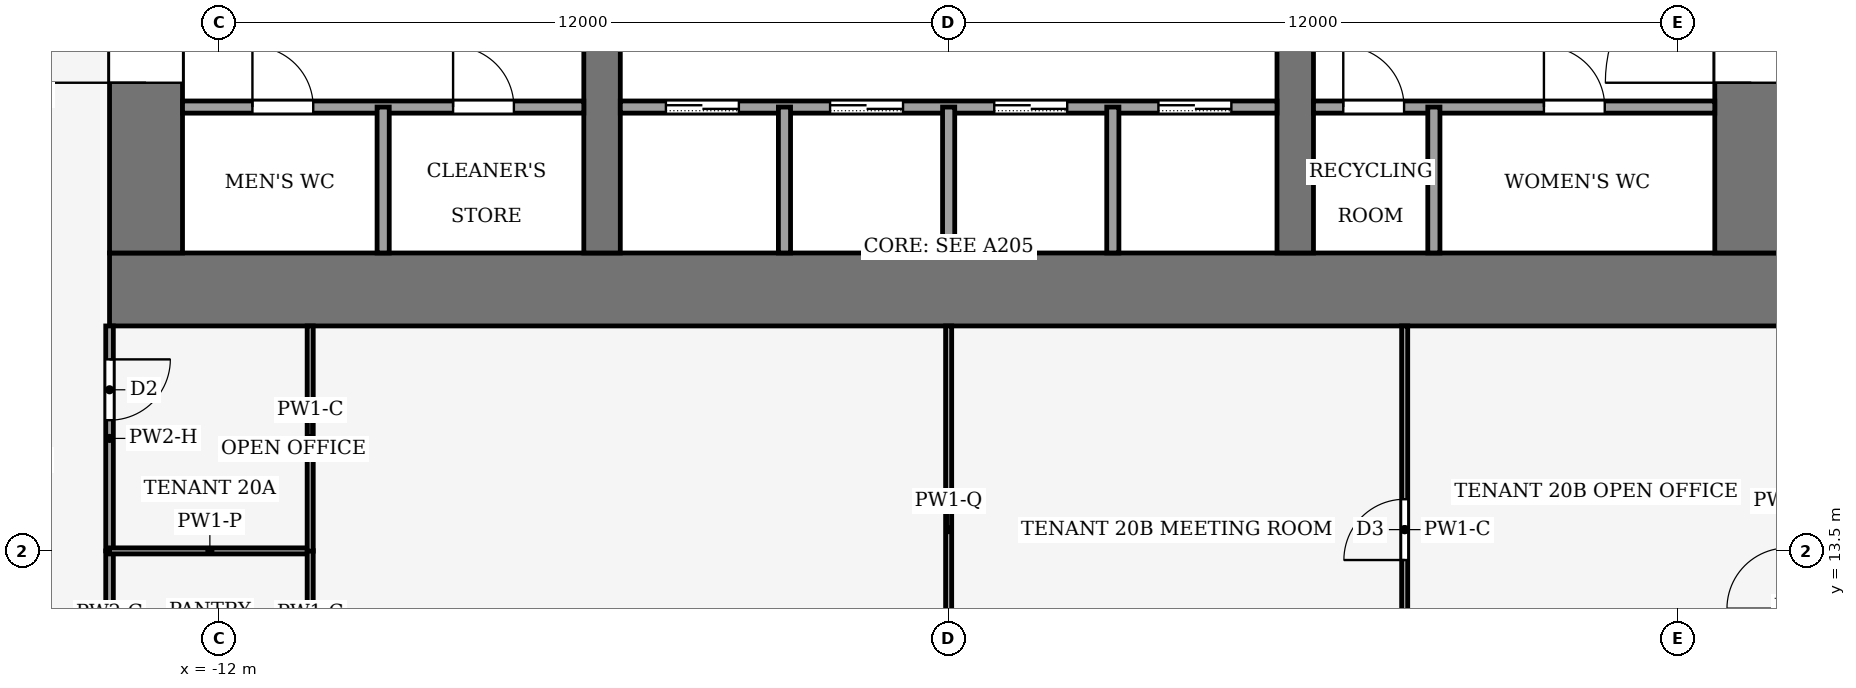
"""IFC4 building model, lengths in metres.
Left out: names, types, materials, properties, quantities, classifications, styles, units other than length and angle.
Written with IfcOpenShell. Run it as: python <this file> out.ifc"""

import sys

from ifc_helpers import new_model, si_unit, direction, frame, frame_2d, origin, place, context, subcontext, project, spatial, rectangle, extrude, element, fill, save


model = new_model("IFC4")
c1 = context("Model", 3, precision=1e-05, world=origin(), true_north=direction((0.0, 1.0)))
c2 = subcontext(c1, "Body", "Model", "MODEL_VIEW")
j1 = project(units=[si_unit("LENGTHUNIT", "METRE"), si_unit("PLANEANGLEUNIT", "RADIAN")], contexts=[c1])
p1 = place(None, origin())
s1 = spatial("IfcSite", under=j1, at=p1, CompositionType="ELEMENT")
p2 = place(p1, origin())
s2 = spatial("IfcBuilding", under=s1, at=p2, CompositionType="ELEMENT")
p3 = place(p2, frame((0.0, 0.0, 90.0)))
s3 = spatial("IfcBuildingStorey", under=s2, at=p3, CompositionType="ELEMENT", Elevation=90.0)
p4 = place(p3, frame((-13.8, 17.8, -0.13), z_axis=(0.0, 0.0, 1.0), x_axis=(1.0, 0.0, 0.0)))
e1 = element("IfcWall", 1, at=p4, inside=s3, PredefinedType="SHEAR", context=c2, shape_type="SweptSolid", body=[
    extrude(rectangle(XDim=27.6, YDim=1.2, at=frame_2d((13.8, 0.0))), origin(), (0.0, 0.0, 1.0), 4.0),
])
p5 = place(p3, frame((-13.2, 18.4, -0.13), z_axis=(0.0, 0.0, 1.0), x_axis=(0.0, 1.0, 0.0)))
e2 = element("IfcWall", 2, at=p5, inside=s3, PredefinedType="SHEAR", context=c2, shape_type="SweptSolid", body=[
    extrude(rectangle(XDim=19.2, YDim=1.2, at=frame_2d((9.6, 0.0))), origin(), (0.0, 0.0, 1.0), 4.0),
])
p6 = place(p5, frame((2.8, 0.0, 0.13)))
e3 = element("IfcOpeningElement", 3, at=p6, cuts=e2, PredefinedType="OPENING", context=c2, shape_type="SweptSolid", body=[
    extrude(rectangle(XDim=2.4, YDim=2.4, at=frame_2d((1.2, 1.2))), frame((0.0, 0.61, 0.0), z_axis=(0.0, -1.0, 0.0), x_axis=(1.0, 0.0, 0.0)), (0.0, 0.0, 1.0), 1.22),
])
p7 = place(p5, frame((13.4, 0.0, 0.13)))
e4 = element("IfcOpeningElement", 4, at=p7, cuts=e2, PredefinedType="OPENING", context=c2, shape_type="SweptSolid", body=[
    extrude(rectangle(XDim=1.4, YDim=2.2, at=frame_2d((0.7, 1.1))), frame((0.0, 0.61, 0.0), z_axis=(0.0, -1.0, 0.0), x_axis=(1.0, 0.0, 0.0)), (0.0, 0.0, 1.0), 1.22),
])
p8 = place(p3, frame((13.2, 18.4, -0.13), z_axis=(0.0, 0.0, 1.0), x_axis=(0.0, 1.0, 0.0)))
e5 = element("IfcWall", 5, at=p8, inside=s3, PredefinedType="SHEAR", context=c2, shape_type="SweptSolid", body=[
    extrude(rectangle(XDim=19.2, YDim=1.2, at=frame_2d((9.6, 0.0))), origin(), (0.0, 0.0, 1.0), 4.0),
])
p9 = place(p8, frame((2.8, 0.0, 0.13)))
e6 = element("IfcOpeningElement", 6, at=p9, cuts=e5, PredefinedType="OPENING", context=c2, shape_type="SweptSolid", body=[
    extrude(rectangle(XDim=2.4, YDim=2.4, at=frame_2d((1.2, 1.2))), frame((0.0, 0.61, 0.0), z_axis=(0.0, -1.0, 0.0), x_axis=(1.0, 0.0, 0.0)), (0.0, 0.0, 1.0), 1.22),
])
p10 = place(p8, frame((13.3, 0.0, 0.13)))
e7 = element("IfcOpeningElement", 7, at=p10, cuts=e5, PredefinedType="OPENING", context=c2, shape_type="SweptSolid", body=[
    extrude(rectangle(XDim=2.4, YDim=2.4, at=frame_2d((1.2, 1.2))), frame((0.0, 0.61, 0.0), z_axis=(0.0, -1.0, 0.0), x_axis=(1.0, 0.0, 0.0)), (0.0, 0.0, 1.0), 1.22),
])
p11 = place(p3, frame((-5.7, 18.4, -0.13), z_axis=(0.0, 0.0, 1.0), x_axis=(0.0, 1.0, 0.0)))
e8 = element("IfcWall", 8, at=p11, inside=s3, PredefinedType="SHEAR", context=c2, shape_type="SweptSolid", body=[
    extrude(rectangle(XDim=19.2, YDim=0.6, at=frame_2d((9.6, 0.0))), origin(), (0.0, 0.0, 1.0), 4.0),
])
p12 = place(p11, frame((8.35, 0.0, 0.13)))
e9 = element("IfcOpeningElement", 9, at=p12, cuts=e8, PredefinedType="OPENING", context=c2, shape_type="SweptSolid", body=[
    extrude(rectangle(XDim=0.9, YDim=2.1, at=frame_2d((0.45, 1.05))), frame((0.0, 0.31, 0.0), z_axis=(0.0, -1.0, 0.0), x_axis=(1.0, 0.0, 0.0)), (0.0, 0.0, 1.0), 0.62),
])
p13 = place(p3, frame((5.7, 18.4, -0.13), z_axis=(0.0, 0.0, 1.0), x_axis=(0.0, 1.0, 0.0)))
e10 = element("IfcWall", 10, at=p13, inside=s3, PredefinedType="SHEAR", context=c2, shape_type="SweptSolid", body=[
    extrude(rectangle(XDim=19.2, YDim=0.6, at=frame_2d((9.6, 0.0))), origin(), (0.0, 0.0, 1.0), 4.0),
])
p14 = place(p13, frame((8.35, 0.0, 0.13)))
e11 = element("IfcOpeningElement", 11, at=p14, cuts=e10, PredefinedType="OPENING", context=c2, shape_type="SweptSolid", body=[
    extrude(rectangle(XDim=0.9, YDim=2.1, at=frame_2d((0.45, 1.05))), frame((0.0, 0.31, 0.0), z_axis=(0.0, -1.0, 0.0), x_axis=(1.0, 0.0, 0.0)), (0.0, 0.0, 1.0), 0.62),
])
p15 = place(p13, frame((13.3, 0.0, 0.13)))
e12 = element("IfcOpeningElement", 12, at=p15, cuts=e10, PredefinedType="OPENING", context=c2, shape_type="SweptSolid", body=[
    extrude(rectangle(XDim=2.4, YDim=2.4, at=frame_2d((1.2, 1.2))), frame((0.0, 0.31, 0.0), z_axis=(0.0, -1.0, 0.0), x_axis=(1.0, 0.0, 0.0)), (0.0, 0.0, 1.0), 0.62),
])
p16 = place(p3, frame((-12.6, 20.8, 0.0), z_axis=(0.0, 0.0, 1.0), x_axis=(1.0, 0.0, 0.0)))
e13 = element("IfcWall", 13, at=p16, inside=s3, PredefinedType="PARTITIONING", context=c2, shape_type="SweptSolid", body=[
    extrude(rectangle(XDim=6.6, YDim=0.2, at=frame_2d((3.3, 0.0))), origin(), (0.0, 0.0, 1.0), 3.87),
])
p17 = place(p16, frame((1.15, 0.0, 0.0)))
e14 = element("IfcOpeningElement", 14, at=p17, cuts=e13, PredefinedType="OPENING", context=c2, shape_type="SweptSolid", body=[
    extrude(rectangle(XDim=1.0, YDim=2.1, at=frame_2d((0.5, 1.05))), frame((0.0, 0.11, 0.0), z_axis=(0.0, -1.0, 0.0), x_axis=(1.0, 0.0, 0.0)), (0.0, 0.0, 1.0), 0.22),
])
p18 = place(p16, frame((4.45, 0.0, 0.0)))
e15 = element("IfcOpeningElement", 15, at=p18, cuts=e13, PredefinedType="OPENING", context=c2, shape_type="SweptSolid", body=[
    extrude(rectangle(XDim=1.0, YDim=2.1, at=frame_2d((0.5, 1.05))), frame((0.0, 0.11, 0.0), z_axis=(0.0, -1.0, 0.0), x_axis=(1.0, 0.0, 0.0)), (0.0, 0.0, 1.0), 0.22),
])
p19 = place(p3, frame((-5.4, 20.8, 0.0), z_axis=(0.0, 0.0, 1.0), x_axis=(1.0, 0.0, 0.0)))
e16 = element("IfcWall", 16, at=p19, inside=s3, PredefinedType="PARTITIONING", context=c2, shape_type="SweptSolid", body=[
    extrude(rectangle(XDim=10.8, YDim=0.2, at=frame_2d((5.4, 0.0))), origin(), (0.0, 0.0, 1.0), 3.87),
])
p20 = place(p19, frame((0.75, 0.0, 0.0)))
e17 = element("IfcOpeningElement", 17, at=p20, cuts=e16, PredefinedType="OPENING", context=c2, shape_type="SweptSolid", body=[
    extrude(rectangle(XDim=1.2, YDim=2.2, at=frame_2d((0.6, 1.1))), frame((0.0, 0.11, 0.0), z_axis=(0.0, -1.0, 0.0), x_axis=(1.0, 0.0, 0.0)), (0.0, 0.0, 1.0), 0.22),
])
p21 = place(p19, frame((3.45, 0.0, 0.0)))
e18 = element("IfcOpeningElement", 18, at=p21, cuts=e16, PredefinedType="OPENING", context=c2, shape_type="SweptSolid", body=[
    extrude(rectangle(XDim=1.2, YDim=2.2, at=frame_2d((0.6, 1.1))), frame((0.0, 0.11, 0.0), z_axis=(0.0, -1.0, 0.0), x_axis=(1.0, 0.0, 0.0)), (0.0, 0.0, 1.0), 0.22),
])
p22 = place(p19, frame((6.15, 0.0, 0.0)))
e19 = element("IfcOpeningElement", 19, at=p22, cuts=e16, PredefinedType="OPENING", context=c2, shape_type="SweptSolid", body=[
    extrude(rectangle(XDim=1.2, YDim=2.2, at=frame_2d((0.6, 1.1))), frame((0.0, 0.11, 0.0), z_axis=(0.0, -1.0, 0.0), x_axis=(1.0, 0.0, 0.0)), (0.0, 0.0, 1.0), 0.22),
])
p23 = place(p19, frame((8.85, 0.0, 0.0)))
e20 = element("IfcOpeningElement", 20, at=p23, cuts=e16, PredefinedType="OPENING", context=c2, shape_type="SweptSolid", body=[
    extrude(rectangle(XDim=1.2, YDim=2.2, at=frame_2d((0.6, 1.1))), frame((0.0, 0.11, 0.0), z_axis=(0.0, -1.0, 0.0), x_axis=(1.0, 0.0, 0.0)), (0.0, 0.0, 1.0), 0.22),
])
p24 = place(p3, frame((6.0, 20.8, 0.0), z_axis=(0.0, 0.0, 1.0), x_axis=(1.0, 0.0, 0.0)))
e21 = element("IfcWall", 21, at=p24, inside=s3, PredefinedType="PARTITIONING", context=c2, shape_type="SweptSolid", body=[
    extrude(rectangle(XDim=6.6, YDim=0.2, at=frame_2d((3.3, 0.0))), origin(), (0.0, 0.0, 1.0), 3.87),
])
p25 = place(p24, frame((0.49, 0.0, 0.0)))
e22 = element("IfcOpeningElement", 22, at=p25, cuts=e21, PredefinedType="OPENING", context=c2, shape_type="SweptSolid", body=[
    extrude(rectangle(XDim=1.0, YDim=2.1, at=frame_2d((0.5, 1.05))), frame((0.0, 0.11, 0.0), z_axis=(0.0, -1.0, 0.0), x_axis=(1.0, 0.0, 0.0)), (0.0, 0.0, 1.0), 0.22),
])
p26 = place(p24, frame((3.79, 0.0, 0.0)))
e23 = element("IfcOpeningElement", 23, at=p26, cuts=e21, PredefinedType="OPENING", context=c2, shape_type="SweptSolid", body=[
    extrude(rectangle(XDim=1.0, YDim=2.1, at=frame_2d((0.5, 1.05))), frame((0.0, 0.11, 0.0), z_axis=(0.0, -1.0, 0.0), x_axis=(1.0, 0.0, 0.0)), (0.0, 0.0, 1.0), 0.22),
])
for number, where, z_axis, x_axis in (
    (24, (-9.3, 18.4, 0.0), (0.0, 0.0, 1.0), (0.0, 1.0, 0.0)),
    (25, (-2.7, 18.4, 0.0), (0.0, 0.0, 1.0), (0.0, 1.0, 0.0)),
    (26, (0.0, 18.4, 0.0), (0.0, 0.0, 1.0), (0.0, 1.0, 0.0)),
    (27, (2.7, 18.4, 0.0), (0.0, 0.0, 1.0), (0.0, 1.0, 0.0)),
    (28, (7.98, 18.4, 0.0), (0.0, 0.0, 1.0), (0.0, 1.0, 0.0)),
):
    element("IfcWall", number, at=place(p3, frame(where, z_axis=z_axis, x_axis=x_axis)), inside=s3, PredefinedType="PARTITIONING", context=c2, shape_type="SweptSolid", body=[
        extrude(rectangle(XDim=2.4, YDim=0.2, at=frame_2d((1.2, 0.0))), origin(), (0.0, 0.0, 1.0), 3.87),
    ])
p27 = place(p3, frame((-13.8, 10.5, 0.0), z_axis=(0.0, 0.0, 1.0), x_axis=(0.0, 1.0, 0.0)))
e29 = element("IfcWall", 29, at=p27, inside=s3, PredefinedType="PARTITIONING", context=c2, shape_type="SweptSolid", body=[
    extrude(rectangle(XDim=3.0, YDim=0.125, at=frame_2d((1.5, 0.0))), origin(), (0.0, 0.0, 1.0), 3.87),
])
p28 = place(p3, frame((-13.8, 17.2, 0.0), z_axis=(0.0, 0.0, 1.0), x_axis=(0.0, -1.0, 0.0)))
e30 = element("IfcWall", 30, at=p28, inside=s3, PredefinedType="PARTITIONING", context=c2, shape_type="SweptSolid", body=[
    extrude(rectangle(XDim=3.7, YDim=0.125, at=frame_2d((1.85, 0.0))), origin(), (0.0, 0.0, 1.0), 3.14),
])
p29 = place(p28, frame((0.55, 0.0, 0.0)))
e31 = element("IfcOpeningElement", 31, at=p29, cuts=e30, PredefinedType="OPENING", context=c2, shape_type="SweptSolid", body=[
    extrude(rectangle(XDim=1.0, YDim=2.1, at=frame_2d((0.5, 1.05))), frame((0.0, 0.073, 0.0), z_axis=(0.0, -1.0, 0.0), x_axis=(1.0, 0.0, 0.0)), (0.0, 0.0, 1.0), 0.145),
])
p30 = place(p3, frame((-10.5, 13.5, 0.0), z_axis=(0.0, 0.0, 1.0), x_axis=(-1.0, 0.0, 0.0)))
e32 = element("IfcWall", 32, at=p30, inside=s3, PredefinedType="PARTITIONING", context=c2, shape_type="SweptSolid", body=[
    extrude(rectangle(XDim=3.3, YDim=0.1, at=frame_2d((1.65, 0.0))), origin(), (0.0, 0.0, 1.0), 3.44),
])
p31 = place(p3, frame((-10.5, 10.496, 0.0), z_axis=(0.0, 0.0, 1.0), x_axis=(0.0, 1.0, 0.0)))
e33 = element("IfcWall", 33, at=p31, inside=s3, PredefinedType="PARTITIONING", context=c2, shape_type="SweptSolid", body=[
    extrude(rectangle(XDim=3.008, YDim=0.1, at=frame_2d((1.504, 0.0))), origin(), (0.0, 0.0, 1.0), 3.87),
])
p32 = place(p3, frame((-10.5, 13.496, 0.0), z_axis=(0.0, 0.0, 1.0), x_axis=(0.0, 1.0, 0.0)))
e34 = element("IfcWall", 34, at=p32, inside=s3, PredefinedType="PARTITIONING", context=c2, shape_type="SweptSolid", body=[
    extrude(rectangle(XDim=3.704, YDim=0.1, at=frame_2d((1.852, 0.0))), origin(), (0.0, 0.0, 1.0), 3.87),
])
p33 = place(p3, frame((0.0, 10.5, 0.0), z_axis=(0.0, 0.0, 1.0), x_axis=(0.0, 1.0, 0.0)))
e35 = element("IfcWall", 35, at=p33, inside=s3, PredefinedType="PARTITIONING", context=c2, shape_type="SweptSolid", body=[
    extrude(rectangle(XDim=6.7, YDim=0.1, at=frame_2d((3.35, 0.0))), origin(), (0.0, 0.0, 1.0), 3.48),
])
p34 = place(p3, frame((7.5, 10.5, 0.0), z_axis=(0.0, 0.0, 1.0), x_axis=(0.0, 1.0, 0.0)))
e36 = element("IfcWall", 36, at=p34, inside=s3, PredefinedType="PARTITIONING", context=c2, shape_type="SweptSolid", body=[
    extrude(rectangle(XDim=6.7, YDim=0.1, at=frame_2d((3.35, 0.0))), origin(), (0.0, 0.0, 1.0), 3.87),
])
p35 = place(p34, frame((2.85, 0.0, 0.0)))
e37 = element("IfcOpeningElement", 37, at=p35, cuts=e36, PredefinedType="OPENING", context=c2, shape_type="SweptSolid", body=[
    extrude(rectangle(XDim=1.0, YDim=2.1, at=frame_2d((0.5, 1.05))), frame((0.0, 0.06, 0.0), z_axis=(0.0, -1.0, 0.0), x_axis=(1.0, 0.0, 0.0)), (0.0, 0.0, 1.0), 0.12),
])
p36 = place(p20, origin())
e38 = element("IfcDoor", 38, at=p36, inside=s3, OperationType="SLIDING_TO_LEFT", PredefinedType="DOOR", context=c2, shape_type="SweptSolid", body=[
    extrude(rectangle(XDim=1.2, YDim=2.2, at=frame_2d((0.6, 1.1))), frame((0.0, 0.025, 0.0), z_axis=(0.0, -1.0, 0.0), x_axis=(1.0, 0.0, 0.0)), (0.0, 0.0, 1.0), 0.05),
])
fill(e17, e38)
p37 = place(p21, origin())
e39 = element("IfcDoor", 39, at=p37, inside=s3, OperationType="SLIDING_TO_LEFT", PredefinedType="DOOR", context=c2, shape_type="SweptSolid", body=[
    extrude(rectangle(XDim=1.2, YDim=2.2, at=frame_2d((0.6, 1.1))), frame((0.0, 0.025, 0.0), z_axis=(0.0, -1.0, 0.0), x_axis=(1.0, 0.0, 0.0)), (0.0, 0.0, 1.0), 0.05),
])
fill(e18, e39)
p38 = place(p22, origin())
e40 = element("IfcDoor", 40, at=p38, inside=s3, OperationType="SLIDING_TO_LEFT", PredefinedType="DOOR", context=c2, shape_type="SweptSolid", body=[
    extrude(rectangle(XDim=1.2, YDim=2.2, at=frame_2d((0.6, 1.1))), frame((0.0, 0.025, 0.0), z_axis=(0.0, -1.0, 0.0), x_axis=(1.0, 0.0, 0.0)), (0.0, 0.0, 1.0), 0.05),
])
fill(e19, e40)
p39 = place(p23, origin())
e41 = element("IfcDoor", 41, at=p39, inside=s3, OperationType="SLIDING_TO_LEFT", PredefinedType="DOOR", context=c2, shape_type="SweptSolid", body=[
    extrude(rectangle(XDim=1.2, YDim=2.2, at=frame_2d((0.6, 1.1))), frame((0.0, 0.025, 0.0), z_axis=(0.0, -1.0, 0.0), x_axis=(1.0, 0.0, 0.0)), (0.0, 0.0, 1.0), 0.05),
])
fill(e20, e41)
p40 = place(p17, origin())
e42 = element("IfcDoor", 42, at=p40, inside=s3, OperationType="SINGLE_SWING_LEFT", PredefinedType="DOOR", context=c2, shape_type="SweptSolid", body=[
    extrude(rectangle(XDim=1.0, YDim=2.1, at=frame_2d((0.5, 1.05))), frame((0.0, 0.025, 0.0), z_axis=(0.0, -1.0, 0.0), x_axis=(1.0, 0.0, 0.0)), (0.0, 0.0, 1.0), 0.05),
])
fill(e14, e42)
p41 = place(p18, origin())
e43 = element("IfcDoor", 43, at=p41, inside=s3, OperationType="SINGLE_SWING_LEFT", PredefinedType="DOOR", context=c2, shape_type="SweptSolid", body=[
    extrude(rectangle(XDim=1.0, YDim=2.1, at=frame_2d((0.5, 1.05))), frame((0.0, 0.025, 0.0), z_axis=(0.0, -1.0, 0.0), x_axis=(1.0, 0.0, 0.0)), (0.0, 0.0, 1.0), 0.05),
])
fill(e15, e43)
p42 = place(p25, origin())
e44 = element("IfcDoor", 44, at=p42, inside=s3, OperationType="SINGLE_SWING_RIGHT", PredefinedType="DOOR", context=c2, shape_type="SweptSolid", body=[
    extrude(rectangle(XDim=1.0, YDim=2.1, at=frame_2d((0.5, 1.05))), frame((0.0, 0.025, 0.0), z_axis=(0.0, -1.0, 0.0), x_axis=(1.0, 0.0, 0.0)), (0.0, 0.0, 1.0), 0.05),
])
fill(e22, e44)
p43 = place(p26, origin())
e45 = element("IfcDoor", 45, at=p43, inside=s3, OperationType="SINGLE_SWING_RIGHT", PredefinedType="DOOR", context=c2, shape_type="SweptSolid", body=[
    extrude(rectangle(XDim=1.0, YDim=2.1, at=frame_2d((0.5, 1.05))), frame((0.0, 0.025, 0.0), z_axis=(0.0, -1.0, 0.0), x_axis=(1.0, 0.0, 0.0)), (0.0, 0.0, 1.0), 0.05),
])
fill(e23, e45)
p44 = place(p6, origin())
e46 = element("IfcDoor", 46, at=p44, inside=s3, OperationType="DOUBLE_DOOR_SINGLE_SWING", PredefinedType="DOOR", context=c2, shape_type="SweptSolid", body=[
    extrude(rectangle(XDim=2.4, YDim=2.4, at=frame_2d((1.2, 1.2))), frame((0.0, 0.025, 0.0), z_axis=(0.0, -1.0, 0.0), x_axis=(1.0, 0.0, 0.0)), (0.0, 0.0, 1.0), 0.05),
])
fill(e3, e46)
p45 = place(p9, origin())
e47 = element("IfcDoor", 47, at=p45, inside=s3, OperationType="DOUBLE_DOOR_SINGLE_SWING", PredefinedType="DOOR", context=c2, shape_type="SweptSolid", body=[
    extrude(rectangle(XDim=2.4, YDim=2.4, at=frame_2d((1.2, 1.2))), frame((0.0, 0.025, 0.0), z_axis=(0.0, -1.0, 0.0), x_axis=(1.0, 0.0, 0.0)), (0.0, 0.0, 1.0), 0.05),
])
fill(e6, e47)
p46 = place(p29, origin())
e48 = element("IfcDoor", 48, at=p46, inside=s3, OperationType="SINGLE_SWING_LEFT", PredefinedType="DOOR", context=c2, shape_type="SweptSolid", body=[
    extrude(rectangle(XDim=1.0, YDim=2.1, at=frame_2d((0.5, 1.05))), frame((0.0, 0.025, 0.0), z_axis=(0.0, -1.0, 0.0), x_axis=(1.0, 0.0, 0.0)), (0.0, 0.0, 1.0), 0.05),
])
fill(e31, e48)
p47 = place(p35, origin())
e49 = element("IfcDoor", 49, at=p47, inside=s3, OperationType="SINGLE_SWING_LEFT", PredefinedType="DOOR", context=c2, shape_type="SweptSolid", body=[
    extrude(rectangle(XDim=1.0, YDim=2.1, at=frame_2d((0.5, 1.05))), frame((0.0, 0.025, 0.0), z_axis=(0.0, -1.0, 0.0), x_axis=(1.0, 0.0, 0.0)), (0.0, 0.0, 1.0), 0.05),
])
fill(e37, e49)
save(model, sys.argv[1])
